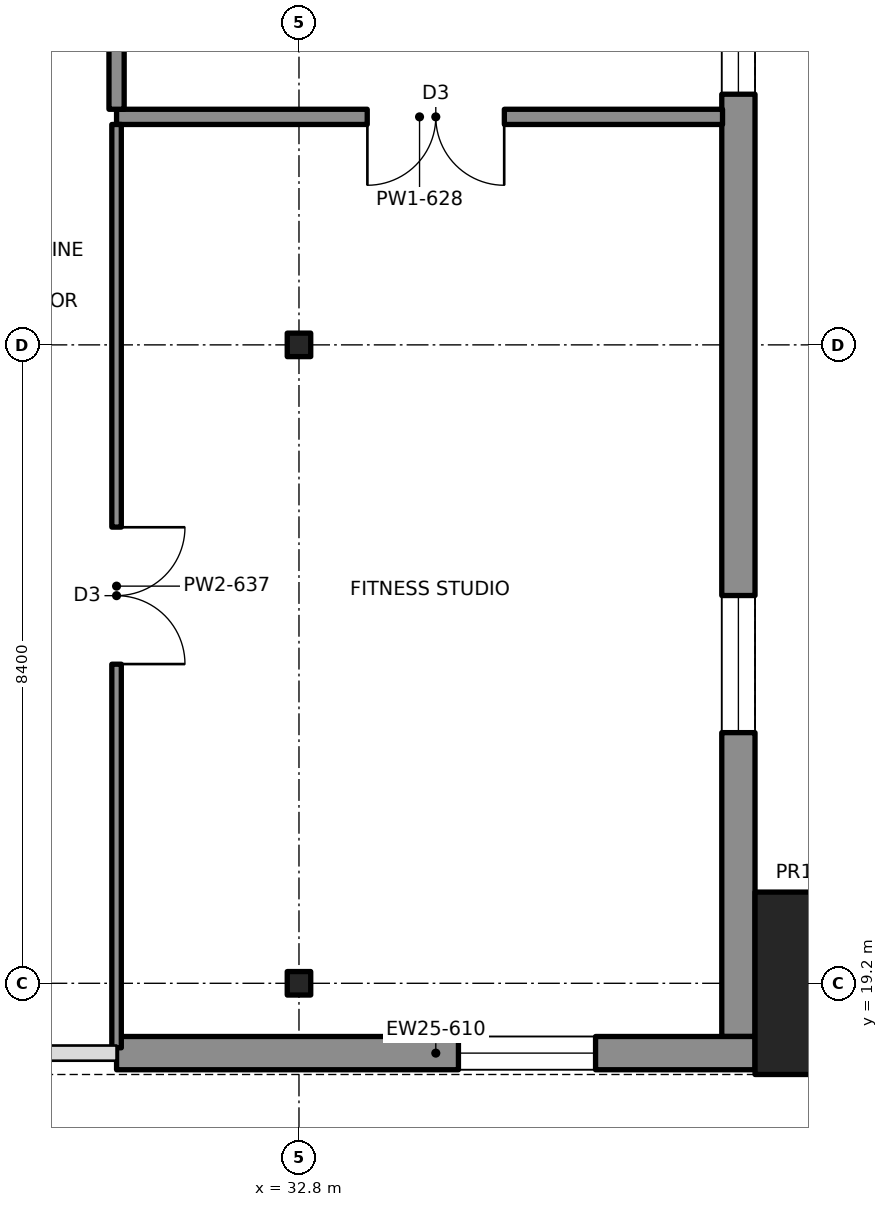
"""IFC4 building model, lengths in metres.
Left out: names, types, materials, properties, quantities, classifications, styles, units other than length and angle.
Written with IfcOpenShell. Run it as: python <this file> out.ifc"""

import sys

from ifc_helpers import new_model, si_unit, direction, frame, frame_2d, origin, origin_2d, place, context, subcontext, project, spatial, rectangle, i_section, extrude, element, fill, save


model = new_model("IFC4")
c1 = context("Model", 3, precision=1e-05, world=origin(), true_north=direction((0.0, 1.0)))
c2 = subcontext(c1, "Body", "Model", "MODEL_VIEW")
j1 = project(units=[si_unit("LENGTHUNIT", "METRE"), si_unit("PLANEANGLEUNIT", "RADIAN")], contexts=[c1])
p1 = place(None, origin())
s1 = spatial("IfcSite", under=j1, at=p1, CompositionType="ELEMENT")
p2 = place(p1, origin())
s2 = spatial("IfcBuilding", under=s1, at=p2, CompositionType="ELEMENT")
p3 = place(p2, frame((0.0, 0.0, 8.8)))
s3 = spatial("IfcBuildingStorey", under=s2, at=p3, CompositionType="ELEMENT", Elevation=8.8)
p4 = place(p3, frame((40.0, 19.2, 0.0), z_axis=(0.0, 0.0, 1.0), x_axis=(1.0, 0.0, 0.0)))
e1 = element("IfcColumn", 1, at=p4, inside=s3, PredefinedType="COLUMN", context=c2, shape_type="SweptSolid", body=[
    extrude(rectangle(XDim=2.4, YDim=2.4, at=origin_2d()), origin(), (0.0, 0.0, 1.0), 3.65),
])
for number, where, z_axis, x_axis in (
    (2, (32.8, 19.2, 0.0), (0.0, 0.0, 1.0), (1.0, 0.0, 0.0)),
    (3, (32.8, 27.6, 0.0), (0.0, 0.0, 1.0), (1.0, 0.0, 0.0)),
):
    element("IfcColumn", number, at=place(p3, frame(where, z_axis=z_axis, x_axis=x_axis)), inside=s3, PredefinedType="COLUMN", context=c2, shape_type="SweptSolid", body=[
        extrude(i_section(OverallWidth=0.309, OverallDepth=0.323, WebThickness=0.014, FlangeThickness=0.023, at=origin_2d()), origin(), (0.0, 0.0, 1.0), 5.2),
    ])
p5 = place(p3, frame((30.4, 18.281, 0.0), z_axis=(0.0, 0.0, 1.0), x_axis=(1.0, 0.0, 0.0)))
e4 = element("IfcWall", 4, at=p5, inside=s3, PredefinedType="SOLIDWALL", context=c2, shape_type="SweptSolid", body=[
    extrude(rectangle(XDim=8.4, YDim=0.438, at=frame_2d((4.2, 0.0))), origin(), (0.0, 0.0, 1.0), 5.2),
])
p6 = place(p5, frame((4.5, 0.0, 0.8)))
e5 = element("IfcOpeningElement", 5, at=p6, cuts=e4, PredefinedType="OPENING", context=c2, shape_type="SweptSolid", body=[
    extrude(rectangle(XDim=1.8, YDim=3.6, at=frame_2d((0.9, 1.8))), frame((0.0, 0.229, 0.0), z_axis=(0.0, -1.0, 0.0), x_axis=(1.0, 0.0, 0.0)), (0.0, 0.0, 1.0), 0.458),
])
p7 = place(p3, frame((38.581, 18.5, 0.0), z_axis=(0.0, 0.0, 1.0), x_axis=(0.0, 1.0, 0.0)))
e6 = element("IfcWall", 6, at=p7, inside=s3, PredefinedType="SOLIDWALL", context=c2, shape_type="SweptSolid", body=[
    extrude(rectangle(XDim=35.0, YDim=0.438, at=frame_2d((17.5, 0.0))), origin(), (0.0, 0.0, 1.0), 5.2),
])
p8 = place(p7, frame((4.0, 0.0, 1.1)))
e7 = element("IfcOpeningElement", 7, at=p8, cuts=e6, PredefinedType="OPENING", context=c2, shape_type="SweptSolid", body=[
    extrude(rectangle(XDim=1.8, YDim=2.8, at=frame_2d((0.9, 1.4))), frame((0.0, 0.229, 0.0), z_axis=(0.0, -1.0, 0.0), x_axis=(1.0, 0.0, 0.0)), (0.0, 0.0, 1.0), 0.458),
])
p9 = place(p7, frame((12.4, 0.0, 1.1)))
e8 = element("IfcOpeningElement", 8, at=p9, cuts=e6, PredefinedType="OPENING", context=c2, shape_type="SweptSolid", body=[
    extrude(rectangle(XDim=1.8, YDim=2.8, at=frame_2d((0.9, 1.4))), frame((0.0, 0.229, 0.0), z_axis=(0.0, -1.0, 0.0), x_axis=(1.0, 0.0, 0.0)), (0.0, 0.0, 1.0), 0.458),
])
p10 = place(p7, frame((20.8, 0.0, 1.1)))
e9 = element("IfcOpeningElement", 9, at=p10, cuts=e6, PredefinedType="OPENING", context=c2, shape_type="SweptSolid", body=[
    extrude(rectangle(XDim=1.8, YDim=2.8, at=frame_2d((0.9, 1.4))), frame((0.0, 0.229, 0.0), z_axis=(0.0, -1.0, 0.0), x_axis=(1.0, 0.0, 0.0)), (0.0, 0.0, 1.0), 0.458),
])
p11 = place(p7, frame((29.2, 0.0, 1.1)))
e10 = element("IfcOpeningElement", 10, at=p11, cuts=e6, PredefinedType="OPENING", context=c2, shape_type="SweptSolid", body=[
    extrude(rectangle(XDim=1.8, YDim=2.8, at=frame_2d((0.9, 1.4))), frame((0.0, 0.229, 0.0), z_axis=(0.0, -1.0, 0.0), x_axis=(1.0, 0.0, 0.0)), (0.0, 0.0, 1.0), 0.458),
])
p12 = place(p3, frame((30.4, 30.6, 0.0), z_axis=(0.0, 0.0, 1.0), x_axis=(1.0, 0.0, 0.0)))
e11 = element("IfcWall", 11, at=p12, inside=s3, PredefinedType="PARTITIONING", context=c2, shape_type="SweptSolid", body=[
    extrude(rectangle(XDim=7.973, YDim=0.2, at=frame_2d((3.986, 0.0))), origin(), (0.0, 0.0, 1.0), 4.45),
])
p13 = place(p12, frame((3.3, 0.0, 0.0)))
e12 = element("IfcOpeningElement", 12, at=p13, cuts=e11, PredefinedType="OPENING", context=c2, shape_type="SweptSolid", body=[
    extrude(rectangle(XDim=1.8, YDim=2.1, at=frame_2d((0.9, 1.05))), frame((0.0, 0.11, 0.0), z_axis=(0.0, -1.0, 0.0), x_axis=(1.0, 0.0, 0.0)), (0.0, 0.0, 1.0), 0.22),
])
p14 = place(p3, frame((30.4, 18.351, 0.0), z_axis=(0.0, 0.0, 1.0), x_axis=(0.0, 1.0, 0.0)))
e13 = element("IfcWall", 13, at=p14, inside=s3, PredefinedType="PARTITIONING", context=c2, shape_type="SweptSolid", body=[
    extrude(rectangle(XDim=12.149, YDim=0.125, at=frame_2d((6.074, 0.0))), origin(), (0.0, 0.0, 1.0), 4.45),
])
p15 = place(p14, frame((5.049, 0.0, 0.0)))
e14 = element("IfcOpeningElement", 14, at=p15, cuts=e13, PredefinedType="OPENING", context=c2, shape_type="SweptSolid", body=[
    extrude(rectangle(XDim=1.8, YDim=2.1, at=frame_2d((0.9, 1.05))), frame((0.0, 0.073, 0.0), z_axis=(0.0, -1.0, 0.0), x_axis=(1.0, 0.0, 0.0)), (0.0, 0.0, 1.0), 0.145),
])
p16 = place(p3, frame((30.4, 30.7, 0.0), z_axis=(0.0, 0.0, 1.0), x_axis=(0.0, 1.0, 0.0)))
e15 = element("IfcWall", 15, at=p16, inside=s3, PredefinedType="PARTITIONING", context=c2, shape_type="SweptSolid", body=[
    extrude(rectangle(XDim=7.8, YDim=0.2, at=frame_2d((3.9, 0.0))), origin(), (0.0, 0.0, 1.0), 4.45),
])
p17 = place(p16, frame((3.45, 0.0, 0.0)))
e16 = element("IfcOpeningElement", 16, at=p17, cuts=e15, PredefinedType="OPENING", context=c2, shape_type="SweptSolid", body=[
    extrude(rectangle(XDim=0.9, YDim=2.1, at=frame_2d((0.45, 1.05))), frame((0.0, 0.11, 0.0), z_axis=(0.0, -1.0, 0.0), x_axis=(1.0, 0.0, 0.0)), (0.0, 0.0, 1.0), 0.22),
])
p18 = place(p6, origin())
e17 = element("IfcWindow", 17, at=p18, inside=s3, PartitioningType="SINGLE_PANEL", PredefinedType="WINDOW", context=c2, shape_type="SweptSolid", body=[
    extrude(rectangle(XDim=1.8, YDim=3.6, at=frame_2d((0.9, 1.8))), frame((0.0, 0.03, 0.0), z_axis=(0.0, -1.0, 0.0), x_axis=(1.0, 0.0, 0.0)), (0.0, 0.0, 1.0), 0.06),
])
fill(e5, e17)
p19 = place(p8, origin())
e18 = element("IfcWindow", 18, at=p19, inside=s3, PartitioningType="SINGLE_PANEL", PredefinedType="WINDOW", context=c2, shape_type="SweptSolid", body=[
    extrude(rectangle(XDim=1.8, YDim=2.8, at=frame_2d((0.9, 1.4))), frame((0.0, 0.03, 0.0), z_axis=(0.0, -1.0, 0.0), x_axis=(1.0, 0.0, 0.0)), (0.0, 0.0, 1.0), 0.06),
])
fill(e7, e18)
p20 = place(p9, origin())
e19 = element("IfcWindow", 19, at=p20, inside=s3, PartitioningType="SINGLE_PANEL", PredefinedType="WINDOW", context=c2, shape_type="SweptSolid", body=[
    extrude(rectangle(XDim=1.8, YDim=2.8, at=frame_2d((0.9, 1.4))), frame((0.0, 0.03, 0.0), z_axis=(0.0, -1.0, 0.0), x_axis=(1.0, 0.0, 0.0)), (0.0, 0.0, 1.0), 0.06),
])
fill(e8, e19)
p21 = place(p15, origin())
e20 = element("IfcDoor", 20, at=p21, inside=s3, OperationType="DOUBLE_DOOR_SINGLE_SWING", PredefinedType="DOOR", context=c2, shape_type="SweptSolid", body=[
    extrude(rectangle(XDim=1.8, YDim=2.1, at=frame_2d((0.9, 1.05))), frame((0.0, 0.025, 0.0), z_axis=(0.0, -1.0, 0.0), x_axis=(1.0, 0.0, 0.0)), (0.0, 0.0, 1.0), 0.05),
])
fill(e14, e20)
p22 = place(p13, origin())
e21 = element("IfcDoor", 21, at=p22, inside=s3, OperationType="DOUBLE_DOOR_SINGLE_SWING", PredefinedType="DOOR", context=c2, shape_type="SweptSolid", body=[
    extrude(rectangle(XDim=1.8, YDim=2.1, at=frame_2d((0.9, 1.05))), frame((0.0, 0.025, 0.0), z_axis=(0.0, -1.0, 0.0), x_axis=(1.0, 0.0, 0.0)), (0.0, 0.0, 1.0), 0.05),
])
fill(e12, e21)
save(model, sys.argv[1])
